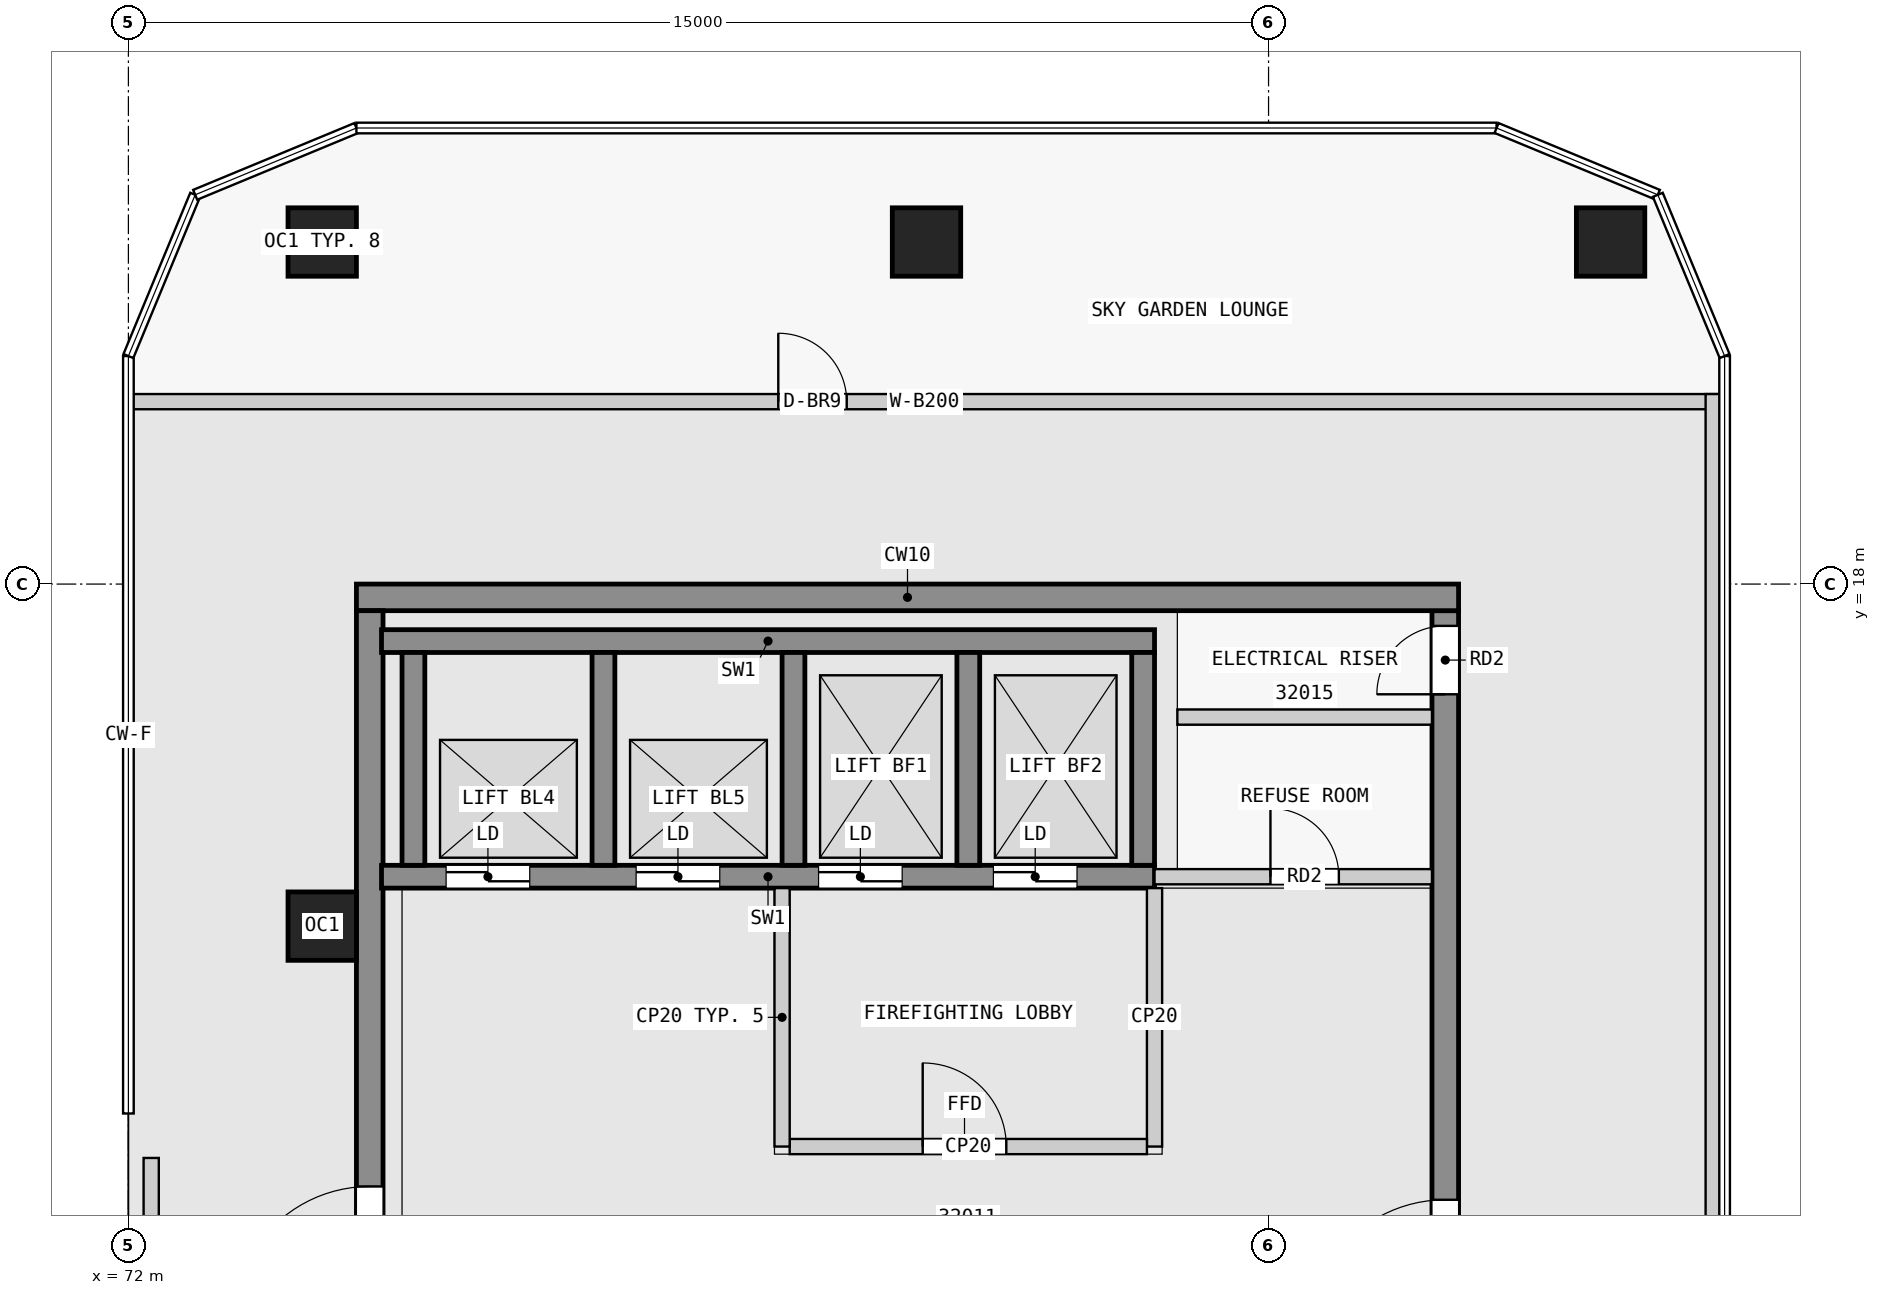
"""IFC4 building model, lengths in metres.
Left out: names, types, materials, properties, quantities, classifications, styles, units other than length and angle.
Written with IfcOpenShell. Run it as: python <this file> out.ifc"""

import sys

from ifc_helpers import new_model, si_unit, direction, frame, frame_2d, origin, origin_2d, place, context, subcontext, project, spatial, rectangle, extrude, element, fill, save


model = new_model("IFC4")
c1 = context("Model", 3, precision=1e-05, world=origin(), true_north=direction((0.0, 1.0)))
c2 = subcontext(c1, "Body", "Model", "MODEL_VIEW")
j1 = project(units=[si_unit("LENGTHUNIT", "METRE"), si_unit("PLANEANGLEUNIT", "RADIAN")], contexts=[c1])
p1 = place(None, origin())
s1 = spatial("IfcSite", under=j1, at=p1, CompositionType="ELEMENT")
p2 = place(p1, origin())
s2 = spatial("IfcBuilding", under=s1, at=p2, CompositionType="ELEMENT")
p3 = place(p2, frame((0.0, 0.0, 123.8)))
s3 = spatial("IfcBuildingStorey", under=s2, at=p3, CompositionType="ELEMENT", Elevation=123.8)
for number, where, z_axis, x_axis in (
    (1, (91.5, 22.5, 0.0), (0.0, 0.0, 1.0), (1.0, 0.0, 0.0)),
    (2, (82.5, 22.5, 0.0), (0.0, 0.0, 1.0), (1.0, 0.0, 0.0)),
    (3, (74.55, 22.5, 0.0), (0.0, 0.0, 1.0), (1.0, 0.0, 0.0)),
    (4, (74.55, 13.5, 0.0), (0.0, 0.0, 1.0), (1.0, 0.0, 0.0)),
):
    element("IfcColumn", number, at=place(p3, frame(where, z_axis=z_axis, x_axis=x_axis)), inside=s3, PredefinedType="COLUMN", context=c2, shape_type="SweptSolid", body=[
        extrude(rectangle(XDim=0.9, YDim=0.9, at=origin_2d()), origin(), (0.0, 0.0, 1.0), 4.8),
    ])
p4 = place(p3, frame((75.0, 17.825, 0.0), z_axis=(0.0, 0.0, 1.0), x_axis=(1.0, 0.0, 0.0)))
e5 = element("IfcWall", 5, at=p4, inside=s3, PredefinedType="SHEAR", context=c2, shape_type="SweptSolid", body=[
    extrude(rectangle(XDim=14.5, YDim=0.35, at=frame_2d((7.25, 0.0))), origin(), (0.0, 0.0, 1.0), 4.5),
])
p5 = place(p3, frame((75.175, 0.35, 0.0), z_axis=(0.0, 0.0, 1.0), x_axis=(0.0, 1.0, 0.0)))
e6 = element("IfcWall", 6, at=p5, inside=s3, PredefinedType="SHEAR", context=c2, shape_type="SweptSolid", body=[
    extrude(rectangle(XDim=17.3, YDim=0.35, at=frame_2d((8.65, 0.0))), origin(), (0.0, 0.0, 1.0), 4.5),
])
p6 = place(p5, frame((7.925, 0.0, 0.0)))
e7 = element("IfcOpeningElement", 7, at=p6, cuts=e6, PredefinedType="OPENING", context=c2, shape_type="SweptSolid", body=[
    extrude(rectangle(XDim=1.8, YDim=2.1, at=frame_2d((0.9, 1.05))), frame((0.0, 0.185, 0.0), z_axis=(0.0, -1.0, 0.0), x_axis=(1.0, 0.0, 0.0)), (0.0, 0.0, 1.0), 0.37),
])
p7 = place(p3, frame((89.325, 0.35, 0.0), z_axis=(0.0, 0.0, 1.0), x_axis=(0.0, 1.0, 0.0)))
e8 = element("IfcWall", 8, at=p7, inside=s3, PredefinedType="SHEAR", context=c2, shape_type="SweptSolid", body=[
    extrude(rectangle(XDim=17.3, YDim=0.35, at=frame_2d((8.65, 0.0))), origin(), (0.0, 0.0, 1.0), 4.5),
])
p8 = place(p7, frame((7.75, 0.0, 0.0)))
e9 = element("IfcOpeningElement", 9, at=p8, cuts=e8, PredefinedType="OPENING", context=c2, shape_type="SweptSolid", body=[
    extrude(rectangle(XDim=1.8, YDim=2.1, at=frame_2d((0.9, 1.05))), frame((0.0, 0.185, 0.0), z_axis=(0.0, -1.0, 0.0), x_axis=(1.0, 0.0, 0.0)), (0.0, 0.0, 1.0), 0.37),
])
p9 = place(p7, frame((16.2, 0.0, 0.0)))
e10 = element("IfcOpeningElement", 10, at=p9, cuts=e8, PredefinedType="OPENING", context=c2, shape_type="SweptSolid", body=[
    extrude(rectangle(XDim=0.9, YDim=2.1, at=frame_2d((0.45, 1.05))), frame((0.0, 0.185, 0.0), z_axis=(0.0, -1.0, 0.0), x_axis=(1.0, 0.0, 0.0)), (0.0, 0.0, 1.0), 0.37),
])
p10 = place(p3, frame((75.33, 17.25, 0.0), z_axis=(0.0, 0.0, 1.0), x_axis=(1.0, 0.0, 0.0)))
e11 = element("IfcWall", 11, at=p10, inside=s3, PredefinedType="SHEAR", context=c2, shape_type="SweptSolid", body=[
    extrude(rectangle(XDim=10.17, YDim=0.3, at=frame_2d((5.085, 0.0))), origin(), (0.0, 0.0, 1.0), 4.5),
])
p11 = place(p3, frame((75.33, 14.15, 0.0), z_axis=(0.0, 0.0, 1.0), x_axis=(1.0, 0.0, 0.0)))
e12 = element("IfcWall", 12, at=p11, inside=s3, PredefinedType="SHEAR", context=c2, shape_type="SweptSolid", body=[
    extrude(rectangle(XDim=10.17, YDim=0.3, at=frame_2d((5.085, 0.0))), origin(), (0.0, 0.0, 1.0), 4.5),
])
p12 = place(p11, frame((0.85, 0.0, 0.0)))
e13 = element("IfcOpeningElement", 13, at=p12, cuts=e12, PredefinedType="OPENING", context=c2, shape_type="SweptSolid", body=[
    extrude(rectangle(XDim=1.1, YDim=2.1, at=frame_2d((0.55, 1.05))), frame((0.0, 0.16, 0.0), z_axis=(0.0, -1.0, 0.0), x_axis=(1.0, 0.0, 0.0)), (0.0, 0.0, 1.0), 0.32),
])
p13 = place(p11, frame((3.35, 0.0, 0.0)))
e14 = element("IfcOpeningElement", 14, at=p13, cuts=e12, PredefinedType="OPENING", context=c2, shape_type="SweptSolid", body=[
    extrude(rectangle(XDim=1.1, YDim=2.1, at=frame_2d((0.55, 1.05))), frame((0.0, 0.16, 0.0), z_axis=(0.0, -1.0, 0.0), x_axis=(1.0, 0.0, 0.0)), (0.0, 0.0, 1.0), 0.32),
])
p14 = place(p11, frame((5.75, 0.0, 0.0)))
e15 = element("IfcOpeningElement", 15, at=p14, cuts=e12, PredefinedType="OPENING", context=c2, shape_type="SweptSolid", body=[
    extrude(rectangle(XDim=1.1, YDim=2.1, at=frame_2d((0.55, 1.05))), frame((0.0, 0.16, 0.0), z_axis=(0.0, -1.0, 0.0), x_axis=(1.0, 0.0, 0.0)), (0.0, 0.0, 1.0), 0.32),
])
p15 = place(p11, frame((8.05, 0.0, 0.0)))
e16 = element("IfcOpeningElement", 16, at=p15, cuts=e12, PredefinedType="OPENING", context=c2, shape_type="SweptSolid", body=[
    extrude(rectangle(XDim=1.1, YDim=2.1, at=frame_2d((0.55, 1.05))), frame((0.0, 0.16, 0.0), z_axis=(0.0, -1.0, 0.0), x_axis=(1.0, 0.0, 0.0)), (0.0, 0.0, 1.0), 0.32),
])
for number, where, z_axis, x_axis in (
    (17, (75.75, 14.3, 0.0), (0.0, 0.0, 1.0), (0.0, 1.0, 0.0)),
    (18, (78.25, 14.3, 0.0), (0.0, 0.0, 1.0), (0.0, 1.0, 0.0)),
    (19, (80.75, 14.3, 0.0), (0.0, 0.0, 1.0), (0.0, 1.0, 0.0)),
    (20, (83.05, 14.3, 0.0), (0.0, 0.0, 1.0), (0.0, 1.0, 0.0)),
    (21, (85.35, 14.3, 0.0), (0.0, 0.0, 1.0), (0.0, 1.0, 0.0)),
):
    element("IfcWall", number, at=place(p3, frame(where, z_axis=z_axis, x_axis=x_axis)), inside=s3, PredefinedType="SHEAR", context=c2, shape_type="SweptSolid", body=[
        extrude(rectangle(XDim=2.8, YDim=0.3, at=frame_2d((1.4, 0.0))), origin(), (0.0, 0.0, 1.0), 4.5),
    ])
p16 = place(p3, frame((80.6, 10.6, 0.0), z_axis=(0.0, 0.0, 1.0), x_axis=(0.0, 1.0, 0.0)))
e22 = element("IfcWall", 22, at=p16, inside=s3, PredefinedType="PARTITIONING", context=c2, shape_type="SweptSolid", body=[
    extrude(rectangle(XDim=3.4, YDim=0.2, at=frame_2d((1.7, 0.0))), origin(), (0.0, 0.0, 1.0), 4.5),
])
p17 = place(p3, frame((80.7, 10.6, 0.0), z_axis=(0.0, 0.0, 1.0), x_axis=(1.0, 0.0, 0.0)))
e23 = element("IfcWall", 23, at=p17, inside=s3, PredefinedType="PARTITIONING", context=c2, shape_type="SweptSolid", body=[
    extrude(rectangle(XDim=4.7, YDim=0.2, at=frame_2d((2.35, 0.0))), origin(), (0.0, 0.0, 1.0), 4.5),
])
p18 = place(p17, frame((1.75, 0.0, 0.0)))
e24 = element("IfcOpeningElement", 24, at=p18, cuts=e23, PredefinedType="OPENING", context=c2, shape_type="SweptSolid", body=[
    extrude(rectangle(XDim=1.1, YDim=2.1, at=frame_2d((0.55, 1.05))), frame((0.0, 0.11, 0.0), z_axis=(0.0, -1.0, 0.0), x_axis=(1.0, 0.0, 0.0)), (0.0, 0.0, 1.0), 0.22),
])
p19 = place(p3, frame((85.5, 10.6, 0.0), z_axis=(0.0, 0.0, 1.0), x_axis=(0.0, 1.0, 0.0)))
e25 = element("IfcWall", 25, at=p19, inside=s3, PredefinedType="PARTITIONING", context=c2, shape_type="SweptSolid", body=[
    extrude(rectangle(XDim=3.4, YDim=0.2, at=frame_2d((1.7, 0.0))), origin(), (0.0, 0.0, 1.0), 4.5),
])
p20 = place(p3, frame((85.5, 14.15, 0.0), z_axis=(0.0, 0.0, 1.0), x_axis=(1.0, 0.0, 0.0)))
e26 = element("IfcWall", 26, at=p20, inside=s3, PredefinedType="PARTITIONING", context=c2, shape_type="SweptSolid", body=[
    extrude(rectangle(XDim=3.65, YDim=0.2, at=frame_2d((1.825, 0.0))), origin(), (0.0, 0.0, 1.0), 4.5),
])
p21 = place(p20, frame((1.525, 0.0, 0.0)))
e27 = element("IfcOpeningElement", 27, at=p21, cuts=e26, PredefinedType="OPENING", context=c2, shape_type="SweptSolid", body=[
    extrude(rectangle(XDim=0.9, YDim=2.1, at=frame_2d((0.45, 1.05))), frame((0.0, 0.11, 0.0), z_axis=(0.0, -1.0, 0.0), x_axis=(1.0, 0.0, 0.0)), (0.0, 0.0, 1.0), 0.22),
])
p22 = place(p3, frame((85.8, 16.25, 0.0), z_axis=(0.0, 0.0, 1.0), x_axis=(1.0, 0.0, 0.0)))
e28 = element("IfcWall", 28, at=p22, inside=s3, PredefinedType="PARTITIONING", context=c2, shape_type="SweptSolid", body=[
    extrude(rectangle(XDim=3.35, YDim=0.2, at=frame_2d((1.675, 0.0))), origin(), (0.0, 0.0, 1.0), 4.5),
])
p23 = place(p3, frame((72.0, 20.4, 0.0), z_axis=(0.0, 0.0, 1.0), x_axis=(1.0, 0.0, 0.0)))
e29 = element("IfcWall", 29, at=p23, inside=s3, PredefinedType="PARTITIONING", context=c2, shape_type="SweptSolid", body=[
    extrude(rectangle(XDim=20.95, YDim=0.2, at=frame_2d((10.475, 0.0))), origin(), (0.0, 0.0, 1.0), 4.5),
])
p24 = place(p23, frame((8.55, 0.0, 0.0)))
e30 = element("IfcOpeningElement", 30, at=p24, cuts=e29, PredefinedType="OPENING", context=c2, shape_type="SweptSolid", body=[
    extrude(rectangle(XDim=0.9, YDim=2.1, at=frame_2d((0.45, 1.05))), frame((0.0, 0.11, 0.0), z_axis=(0.0, -1.0, 0.0), x_axis=(1.0, 0.0, 0.0)), (0.0, 0.0, 1.0), 0.22),
])
p25 = place(p3, frame((92.85, -2.5, 0.0), z_axis=(0.0, 0.0, 1.0), x_axis=(0.0, 1.0, 0.0)))
e31 = element("IfcWall", 31, at=p25, inside=s3, PredefinedType="PARTITIONING", context=c2, shape_type="SweptSolid", body=[
    extrude(rectangle(XDim=23.0, YDim=0.2, at=frame_2d((11.5, 0.0))), origin(), (0.0, 0.0, 1.0), 4.5),
])
p26 = place(p3, frame((72.3, 7.55, 0.0), z_axis=(0.0, 0.0, 1.0), x_axis=(0.0, 1.0, 0.0)))
e32 = element("IfcWall", 32, at=p26, inside=s3, PredefinedType="PARTITIONING", context=c2, shape_type="SweptSolid", body=[
    extrude(rectangle(XDim=2.9, YDim=0.2, at=frame_2d((1.45, 0.0))), origin(), (0.0, 0.0, 1.0), 4.5),
])
p27 = place(p26, frame((0.85, 0.0, 0.0)))
e33 = element("IfcOpeningElement", 33, at=p27, cuts=e32, PredefinedType="OPENING", context=c2, shape_type="SweptSolid", body=[
    extrude(rectangle(XDim=1.2, YDim=2.1, at=frame_2d((0.6, 1.05))), frame((0.0, 0.11, 0.0), z_axis=(0.0, -1.0, 0.0), x_axis=(1.0, 0.0, 0.0)), (0.0, 0.0, 1.0), 0.22),
])
p28 = place(p18, origin())
e34 = element("IfcDoor", 34, at=p28, inside=s3, OperationType="SINGLE_SWING_LEFT", PredefinedType="DOOR", context=c2, shape_type="SweptSolid", body=[
    extrude(rectangle(XDim=1.1, YDim=2.1, at=frame_2d((0.55, 1.05))), frame((0.0, 0.025, 0.0), z_axis=(0.0, -1.0, 0.0), x_axis=(1.0, 0.0, 0.0)), (0.0, 0.0, 1.0), 0.05),
])
fill(e24, e34)
p29 = place(p12, origin())
e35 = element("IfcDoor", 35, at=p29, inside=s3, OperationType="DOUBLE_DOOR_SLIDING", PredefinedType="DOOR", context=c2, shape_type="SweptSolid", body=[
    extrude(rectangle(XDim=1.1, YDim=2.1, at=frame_2d((0.55, 1.05))), frame((0.0, 0.025, 0.0), z_axis=(0.0, -1.0, 0.0), x_axis=(1.0, 0.0, 0.0)), (0.0, 0.0, 1.0), 0.05),
])
fill(e13, e35)
p30 = place(p13, origin())
e36 = element("IfcDoor", 36, at=p30, inside=s3, OperationType="DOUBLE_DOOR_SLIDING", PredefinedType="DOOR", context=c2, shape_type="SweptSolid", body=[
    extrude(rectangle(XDim=1.1, YDim=2.1, at=frame_2d((0.55, 1.05))), frame((0.0, 0.025, 0.0), z_axis=(0.0, -1.0, 0.0), x_axis=(1.0, 0.0, 0.0)), (0.0, 0.0, 1.0), 0.05),
])
fill(e14, e36)
p31 = place(p14, origin())
e37 = element("IfcDoor", 37, at=p31, inside=s3, OperationType="DOUBLE_DOOR_SLIDING", PredefinedType="DOOR", context=c2, shape_type="SweptSolid", body=[
    extrude(rectangle(XDim=1.1, YDim=2.1, at=frame_2d((0.55, 1.05))), frame((0.0, 0.025, 0.0), z_axis=(0.0, -1.0, 0.0), x_axis=(1.0, 0.0, 0.0)), (0.0, 0.0, 1.0), 0.05),
])
fill(e15, e37)
p32 = place(p15, origin())
e38 = element("IfcDoor", 38, at=p32, inside=s3, OperationType="DOUBLE_DOOR_SLIDING", PredefinedType="DOOR", context=c2, shape_type="SweptSolid", body=[
    extrude(rectangle(XDim=1.1, YDim=2.1, at=frame_2d((0.55, 1.05))), frame((0.0, 0.025, 0.0), z_axis=(0.0, -1.0, 0.0), x_axis=(1.0, 0.0, 0.0)), (0.0, 0.0, 1.0), 0.05),
])
fill(e16, e38)
p33 = place(p6, origin())
e39 = element("IfcDoor", 39, at=p33, inside=s3, OperationType="DOUBLE_DOOR_SINGLE_SWING", PredefinedType="DOOR", context=c2, shape_type="SweptSolid", body=[
    extrude(rectangle(XDim=1.8, YDim=2.1, at=frame_2d((0.9, 1.05))), frame((0.0, 0.025, 0.0), z_axis=(0.0, -1.0, 0.0), x_axis=(1.0, 0.0, 0.0)), (0.0, 0.0, 1.0), 0.05),
])
fill(e7, e39)
p34 = place(p8, origin())
e40 = element("IfcDoor", 40, at=p34, inside=s3, OperationType="DOUBLE_DOOR_SINGLE_SWING", PredefinedType="DOOR", context=c2, shape_type="SweptSolid", body=[
    extrude(rectangle(XDim=1.8, YDim=2.1, at=frame_2d((0.9, 1.05))), frame((0.0, 0.025, 0.0), z_axis=(0.0, -1.0, 0.0), x_axis=(1.0, 0.0, 0.0)), (0.0, 0.0, 1.0), 0.05),
])
fill(e9, e40)
p35 = place(p21, origin())
e41 = element("IfcDoor", 41, at=p35, inside=s3, OperationType="SINGLE_SWING_LEFT", PredefinedType="DOOR", context=c2, shape_type="SweptSolid", body=[
    extrude(rectangle(XDim=0.9, YDim=2.1, at=frame_2d((0.45, 1.05))), frame((0.0, 0.025, 0.0), z_axis=(0.0, -1.0, 0.0), x_axis=(1.0, 0.0, 0.0)), (0.0, 0.0, 1.0), 0.05),
])
fill(e27, e41)
p36 = place(p9, origin())
e42 = element("IfcDoor", 42, at=p36, inside=s3, OperationType="SINGLE_SWING_LEFT", PredefinedType="DOOR", context=c2, shape_type="SweptSolid", body=[
    extrude(rectangle(XDim=0.9, YDim=2.1, at=frame_2d((0.45, 1.05))), frame((0.0, 0.025, 0.0), z_axis=(0.0, -1.0, 0.0), x_axis=(1.0, 0.0, 0.0)), (0.0, 0.0, 1.0), 0.05),
])
fill(e10, e42)
p37 = place(p24, origin())
e43 = element("IfcDoor", 43, at=p37, inside=s3, OperationType="SINGLE_SWING_LEFT", PredefinedType="DOOR", context=c2, shape_type="SweptSolid", body=[
    extrude(rectangle(XDim=0.9, YDim=2.1, at=frame_2d((0.45, 1.05))), frame((0.0, 0.025, 0.0), z_axis=(0.0, -1.0, 0.0), x_axis=(1.0, 0.0, 0.0)), (0.0, 0.0, 1.0), 0.05),
])
fill(e30, e43)
save(model, sys.argv[1])
